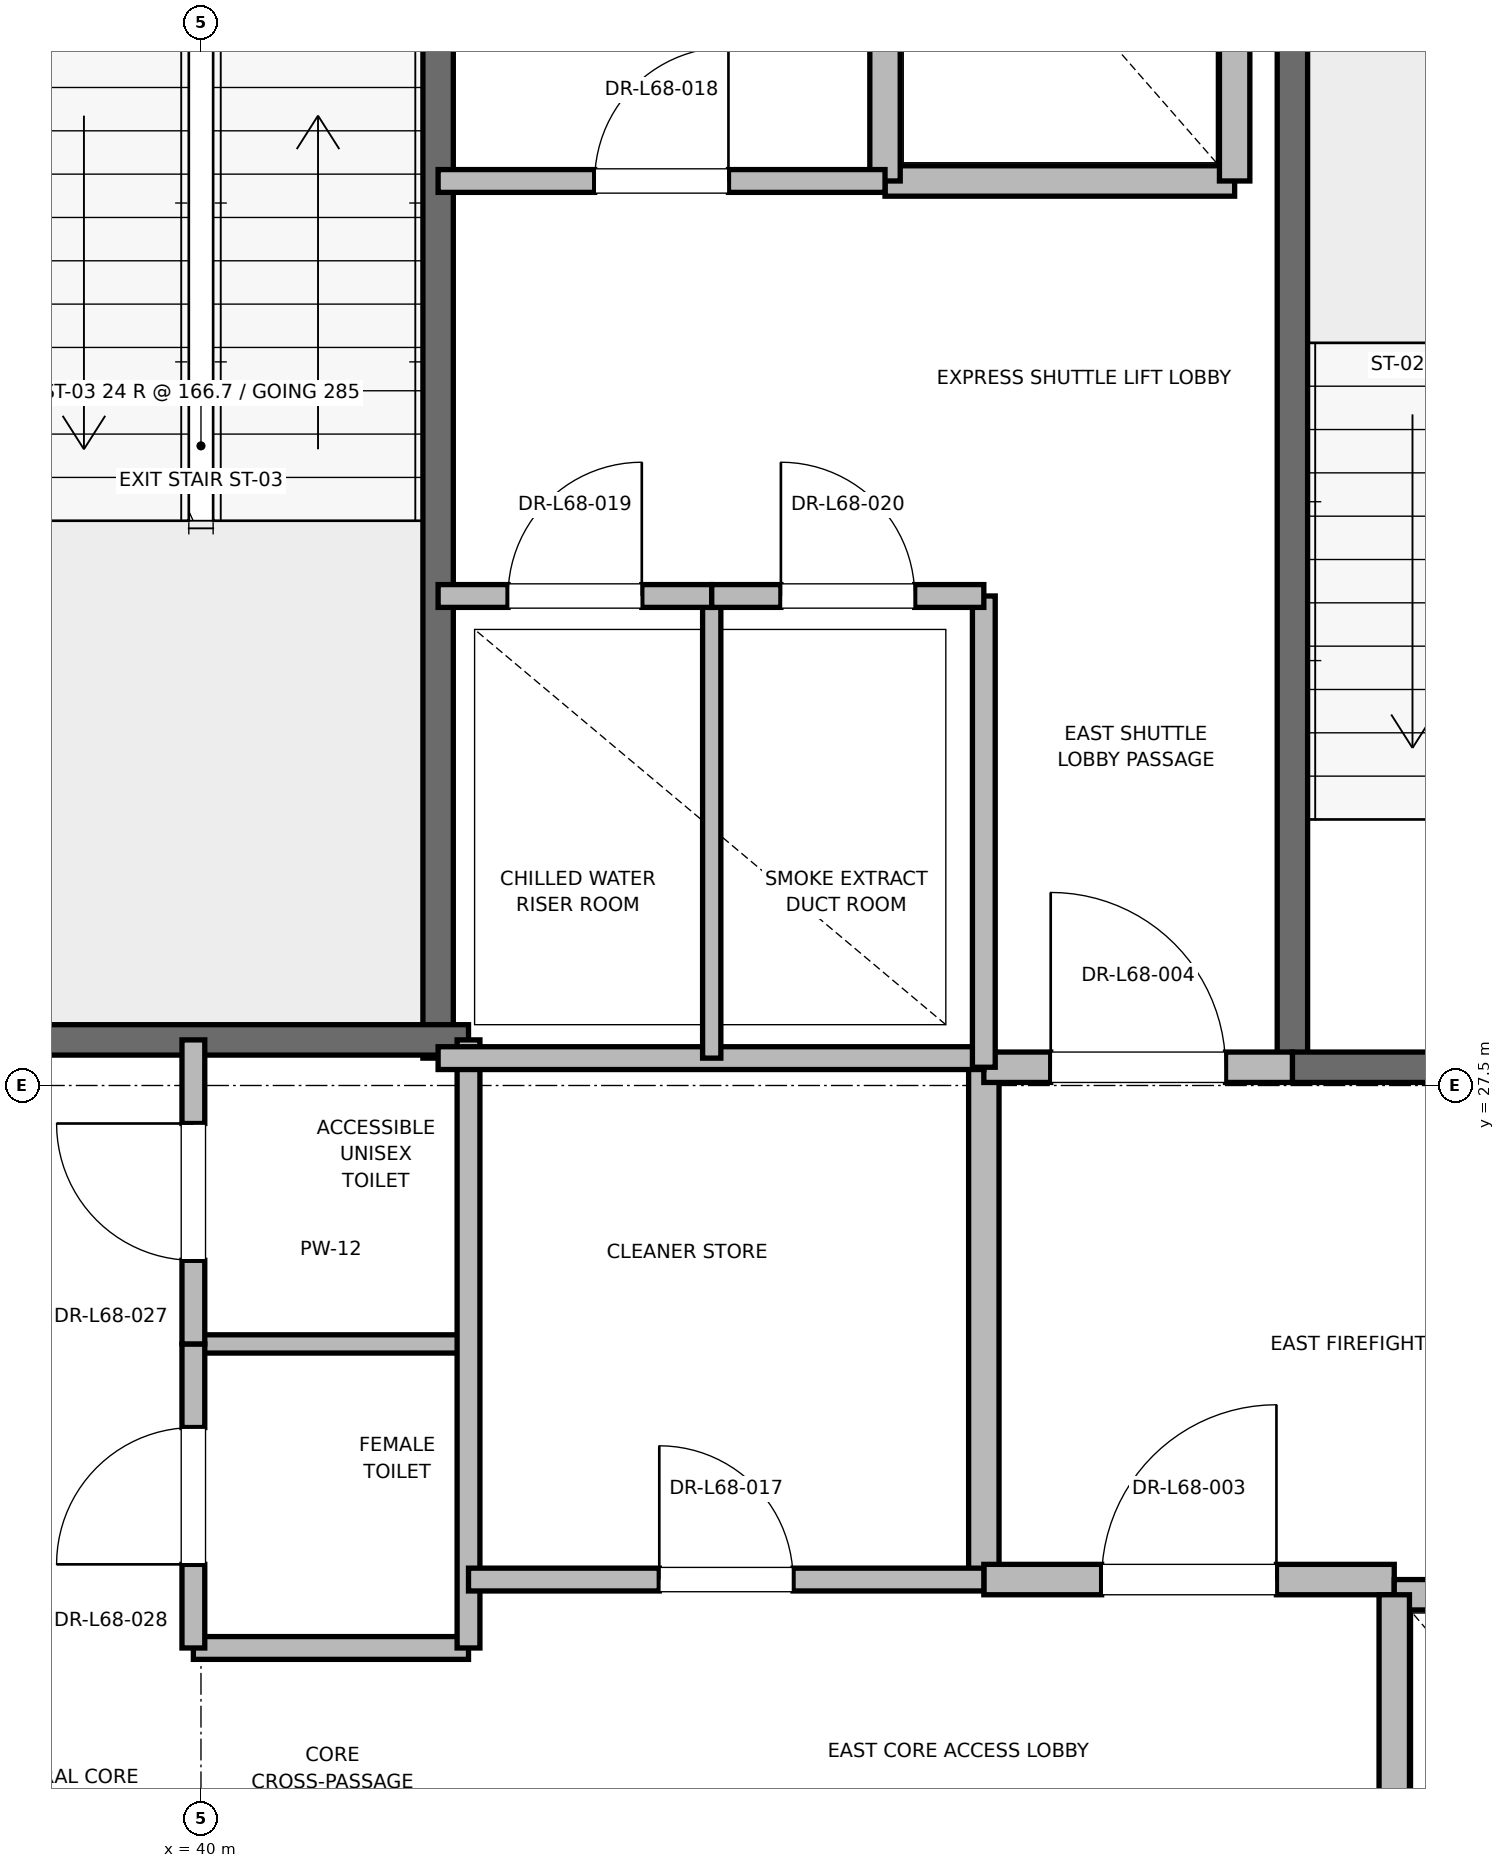
"""IFC4 building model, lengths in metres.
Left out: names, types, materials, properties, quantities, classifications, styles, units other than length and angle.
Written with IfcOpenShell. Run it as: python <this file> out.ifc"""

import sys

from ifc_helpers import new_model, si_unit, direction, frame, frame_2d, origin, place, context, subcontext, project, spatial, rectangle, extrude, element, fill, save


model = new_model("IFC4")
c1 = context("Model", 3, precision=1e-05, world=origin(), true_north=direction((0.0, 1.0)))
c2 = subcontext(c1, "Body", "Model", "MODEL_VIEW")
j1 = project(units=[si_unit("LENGTHUNIT", "METRE"), si_unit("PLANEANGLEUNIT", "RADIAN")], contexts=[c1])
p1 = place(None, origin())
s1 = spatial("IfcSite", under=j1, at=p1, CompositionType="ELEMENT")
p2 = place(p1, origin())
s2 = spatial("IfcBuilding", under=s1, at=p2, CompositionType="ELEMENT")
p3 = place(p2, frame((0.0, 0.0, 291.2)))
s3 = spatial("IfcBuildingStorey", under=s2, at=p3, CompositionType="ELEMENT", Elevation=291.2)
p4 = place(p3, frame((47.18, 27.62, 0.0), z_axis=(0.0, 0.0, 1.0), x_axis=(0.0, 1.0, 0.0)))
e1 = element("IfcWall", 1, at=p4, inside=s3, PredefinedType="SOLIDWALL", context=c2, shape_type="SweptSolid", body=[
    extrude(rectangle(XDim=8.18, YDim=0.2, at=frame_2d((4.09, 0.0))), origin(), (0.0, 0.0, 1.0), 3.7),
])
p5 = place(p3, frame((47.18, 27.62, 0.0), z_axis=(0.0, 0.0, 1.0), x_axis=(1.0, 0.0, 0.0)))
e2 = element("IfcWall", 2, at=p5, inside=s3, PredefinedType="SOLIDWALL", context=c2, shape_type="SweptSolid", body=[
    extrude(rectangle(XDim=3.12, YDim=0.2, at=frame_2d((1.56, 0.0))), origin(), (0.0, 0.0, 1.0), 3.7),
])
p6 = place(p5, frame((1.01, 0.0, 0.0)))
e3 = element("IfcOpeningElement", 3, at=p6, cuts=e2, PredefinedType="OPENING", context=c2, shape_type="SweptSolid", body=[
    extrude(rectangle(XDim=1.1, YDim=2.15, at=frame_2d((0.55, 1.075))), frame((0.0, 0.1, 0.0), z_axis=(0.0, -1.0, 0.0), x_axis=(1.0, 0.0, 0.0)), (0.0, 0.0, 1.0), 0.2),
])
p7 = place(p3, frame((41.56, 27.68, 0.0), z_axis=(0.0, 0.0, 1.0), x_axis=(0.0, 1.0, 0.0)))
e4 = element("IfcWall", 4, at=p7, inside=s3, PredefinedType="SOLIDWALL", context=c2, shape_type="SweptSolid", body=[
    extrude(rectangle(XDim=8.57, YDim=0.2, at=frame_2d((4.285, 0.0))), origin(), (0.0, 0.0, 1.0), 3.7),
])
p8 = place(p3, frame((38.44, 27.8, 0.0), z_axis=(0.0, 0.0, 1.0), x_axis=(1.0, 0.0, 0.0)))
e5 = element("IfcWall", 5, at=p8, inside=s3, PredefinedType="SOLIDWALL", context=c2, shape_type="SweptSolid", body=[
    extrude(rectangle(XDim=3.32, YDim=0.2, at=frame_2d((1.66, 0.0))), origin(), (0.0, 0.0, 1.0), 3.7),
])
p9 = place(p3, frame((45.15, 24.25, 0.0), z_axis=(0.0, 0.0, 1.0), x_axis=(0.0, 1.0, 0.0)))
e6 = element("IfcWall", 6, at=p9, inside=s3, PredefinedType="PARTITIONING", context=c2, shape_type="SweptSolid", body=[
    extrude(rectangle(XDim=3.37, YDim=0.2, at=frame_2d((1.685, 0.0))), origin(), (0.0, 0.0, 1.0), 3.7),
])
p10 = place(p3, frame((45.15, 24.25, 0.0), z_axis=(0.0, 0.0, 1.0), x_axis=(1.0, 0.0, 0.0)))
e7 = element("IfcWall", 7, at=p10, inside=s3, PredefinedType="PARTITIONING", context=c2, shape_type="SweptSolid", body=[
    extrude(rectangle(XDim=2.7, YDim=0.2, at=frame_2d((1.35, 0.0))), origin(), (0.0, 0.0, 1.0), 3.7),
])
p11 = place(p10, frame((0.775, 0.0, 0.0)))
e8 = element("IfcOpeningElement", 8, at=p11, cuts=e7, PredefinedType="OPENING", context=c2, shape_type="SweptSolid", body=[
    extrude(rectangle(XDim=1.15, YDim=2.2, at=frame_2d((0.575, 1.1))), frame((0.0, 0.1, 0.0), z_axis=(0.0, -1.0, 0.0), x_axis=(1.0, 0.0, 0.0)), (0.0, 0.0, 1.0), 0.2),
])
p12 = place(p3, frame((45.15, 27.62, 0.0), z_axis=(0.0, 0.0, 1.0), x_axis=(1.0, 0.0, 0.0)))
e9 = element("IfcWall", 9, at=p12, inside=s3, PredefinedType="PARTITIONING", context=c2, shape_type="SweptSolid", body=[
    extrude(rectangle(XDim=2.03, YDim=0.2, at=frame_2d((1.015, 0.0))), origin(), (0.0, 0.0, 1.0), 3.7),
])
p13 = place(p12, frame((0.44, 0.0, 0.0)))
e10 = element("IfcOpeningElement", 10, at=p13, cuts=e9, PredefinedType="OPENING", context=c2, shape_type="SweptSolid", body=[
    extrude(rectangle(XDim=1.15, YDim=2.2, at=frame_2d((0.575, 1.1))), frame((0.0, 0.1, 0.0), z_axis=(0.0, -1.0, 0.0), x_axis=(1.0, 0.0, 0.0)), (0.0, 0.0, 1.0), 0.2),
])
p14 = place(p3, frame((50.45, 24.15, 0.0), z_axis=(0.0, 0.0, 1.0), x_axis=(-1.0, 0.0, 0.0)))
e11 = element("IfcWall", 11, at=p14, inside=s3, PredefinedType="SOLIDWALL", context=c2, shape_type="SweptSolid", body=[
    extrude(rectangle(XDim=2.6, YDim=0.2, at=frame_2d((1.3, 0.0))), origin(), (0.0, 0.0, 1.0), 2.78),
])
p15 = place(p14, frame((0.75, 0.0, 0.0)))
e12 = element("IfcOpeningElement", 12, at=p15, cuts=e11, PredefinedType="OPENING", context=c2, shape_type="SweptSolid", body=[
    extrude(rectangle(XDim=1.1, YDim=2.2, at=frame_2d((0.55, 1.1))), frame((0.0, 0.1, 0.0), z_axis=(0.0, -1.0, 0.0), x_axis=(1.0, 0.0, 0.0)), (0.0, 0.0, 1.0), 0.2),
])
p16 = place(p3, frame((47.85, 24.15, 0.0), z_axis=(0.0, 0.0, 1.0), x_axis=(0.0, -1.0, 0.0)))
e13 = element("IfcWall", 13, at=p16, inside=s3, PredefinedType="SOLIDWALL", context=c2, shape_type="SweptSolid", body=[
    extrude(rectangle(XDim=3.0, YDim=0.2, at=frame_2d((1.5, 0.0))), origin(), (0.0, 0.0, 1.0), 3.7),
])
p17 = place(p3, frame((44.5, 33.45, 0.0), z_axis=(0.0, 0.0, 1.0), x_axis=(1.0, 0.0, 0.0)))
e14 = element("IfcWall", 14, at=p17, inside=s3, PredefinedType="SOLIDWALL", context=c2, shape_type="SweptSolid", body=[
    extrude(rectangle(XDim=2.3, YDim=0.2, at=frame_2d((1.15, 0.0))), origin(), (0.0, 0.0, 1.0), 3.7),
])
p18 = place(p3, frame((44.5, 36.05, 0.0), z_axis=(0.0, 0.0, 1.0), x_axis=(0.0, -1.0, 0.0)))
e15 = element("IfcWall", 15, at=p18, inside=s3, PredefinedType="SOLIDWALL", context=c2, shape_type="SweptSolid", body=[
    extrude(rectangle(XDim=2.6, YDim=0.2, at=frame_2d((1.3, 0.0))), origin(), (0.0, 0.0, 1.0), 2.78),
])
p19 = place(p3, frame((46.8, 33.45, 0.0), z_axis=(0.0, 0.0, 1.0), x_axis=(0.0, 1.0, 0.0)))
e16 = element("IfcWall", 16, at=p19, inside=s3, PredefinedType="SOLIDWALL", context=c2, shape_type="SweptSolid", body=[
    extrude(rectangle(XDim=2.6, YDim=0.2, at=frame_2d((1.3, 0.0))), origin(), (0.0, 0.0, 1.0), 3.7),
])
p20 = place(p3, frame((39.95, 23.8, 0.0), z_axis=(0.0, 0.0, 1.0), x_axis=(1.0, 0.0, 0.0)))
e17 = element("IfcWall", 17, at=p20, inside=s3, PredefinedType="PARTITIONING", context=c2, shape_type="SweptSolid", body=[
    extrude(rectangle(XDim=1.81, YDim=0.15, at=frame_2d((0.905, 0.0))), origin(), (0.0, 0.0, 1.0), 2.85),
])
p21 = place(p3, frame((39.95, 25.8, 0.0), z_axis=(0.0, 0.0, 1.0), x_axis=(1.0, 0.0, 0.0)))
e18 = element("IfcWall", 18, at=p21, inside=s3, PredefinedType="PARTITIONING", context=c2, shape_type="SweptSolid", body=[
    extrude(rectangle(XDim=1.81, YDim=0.12, at=frame_2d((0.905, 0.0))), origin(), (0.0, 0.0, 1.0), 2.85),
])
p22 = place(p3, frame((41.76, 23.8, 0.0), z_axis=(0.0, 0.0, 1.0), x_axis=(0.0, 1.0, 0.0)))
e19 = element("IfcWall", 19, at=p22, inside=s3, PredefinedType="PARTITIONING", context=c2, shape_type="SweptSolid", body=[
    extrude(rectangle(XDim=4.0, YDim=0.15, at=frame_2d((2.0, 0.0))), origin(), (0.0, 0.0, 1.0), 2.85),
])
p23 = place(p3, frame((39.95, 23.8, 0.0), z_axis=(0.0, 0.0, 1.0), x_axis=(0.0, 1.0, 0.0)))
e20 = element("IfcWall", 20, at=p23, inside=s3, PredefinedType="PARTITIONING", context=c2, shape_type="SweptSolid", body=[
    extrude(rectangle(XDim=2.0, YDim=0.15, at=frame_2d((1.0, 0.0))), origin(), (0.0, 0.0, 1.0), 2.85),
])
p24 = place(p23, frame((0.55, 0.0, 0.0)))
e21 = element("IfcOpeningElement", 21, at=p24, cuts=e20, PredefinedType="OPENING", context=c2, shape_type="SweptSolid", body=[
    extrude(rectangle(XDim=0.9, YDim=2.1, at=frame_2d((0.45, 1.05))), frame((0.0, 0.075, 0.0), z_axis=(0.0, -1.0, 0.0), x_axis=(1.0, 0.0, 0.0)), (0.0, 0.0, 1.0), 0.15),
])
p25 = place(p3, frame((39.95, 25.8, 0.0), z_axis=(0.0, 0.0, 1.0), x_axis=(0.0, 1.0, 0.0)))
e22 = element("IfcWall", 22, at=p25, inside=s3, PredefinedType="PARTITIONING", context=c2, shape_type="SweptSolid", body=[
    extrude(rectangle(XDim=2.0, YDim=0.15, at=frame_2d((1.0, 0.0))), origin(), (0.0, 0.0, 1.0), 2.85),
])
p26 = place(p25, frame((0.55, 0.0, 0.0)))
e23 = element("IfcOpeningElement", 23, at=p26, cuts=e22, PredefinedType="OPENING", context=c2, shape_type="SweptSolid", body=[
    extrude(rectangle(XDim=0.9, YDim=2.1, at=frame_2d((0.45, 1.05))), frame((0.0, 0.075, 0.0), z_axis=(0.0, -1.0, 0.0), x_axis=(1.0, 0.0, 0.0)), (0.0, 0.0, 1.0), 0.15),
])
p27 = place(p3, frame((41.56, 27.68, 0.0), z_axis=(0.0, 0.0, 1.0), x_axis=(1.0, 0.0, 0.0)))
e24 = element("IfcWall", 24, at=p27, inside=s3, PredefinedType="PARTITIONING", context=c2, shape_type="SweptSolid", body=[
    extrude(rectangle(XDim=3.59, YDim=0.15, at=frame_2d((1.795, 0.0))), origin(), (0.0, 0.0, 1.0), 2.85),
])
p28 = place(p3, frame((41.76, 24.25, 0.0), z_axis=(0.0, 0.0, 1.0), x_axis=(1.0, 0.0, 0.0)))
e25 = element("IfcWall", 25, at=p28, inside=s3, PredefinedType="PARTITIONING", context=c2, shape_type="SweptSolid", body=[
    extrude(rectangle(XDim=3.39, YDim=0.15, at=frame_2d((1.695, 0.0))), origin(), (0.0, 0.0, 1.0), 2.85),
])
p29 = place(p28, frame((1.255, 0.0, 0.0)))
e26 = element("IfcOpeningElement", 26, at=p29, cuts=e25, PredefinedType="OPENING", context=c2, shape_type="SweptSolid", body=[
    extrude(rectangle(XDim=0.88, YDim=2.1, at=frame_2d((0.44, 1.05))), frame((0.0, 0.075, 0.0), z_axis=(0.0, -1.0, 0.0), x_axis=(1.0, 0.0, 0.0)), (0.0, 0.0, 1.0), 0.15),
])
p30 = place(p3, frame((45.15, 27.62, 0.0), z_axis=(0.0, 0.0, 1.0), x_axis=(0.0, 1.0, 0.0)))
e27 = element("IfcWall", 27, at=p30, inside=s3, PredefinedType="PARTITIONING", context=c2, shape_type="SweptSolid", body=[
    extrude(rectangle(XDim=3.1, YDim=0.15, at=frame_2d((1.55, 0.0))), origin(), (0.0, 0.0, 1.0), 2.85),
])
p31 = place(p3, frame((43.36, 27.68, 0.0), z_axis=(0.0, 0.0, 1.0), x_axis=(0.0, 1.0, 0.0)))
e28 = element("IfcWall", 28, at=p31, inside=s3, PredefinedType="PARTITIONING", context=c2, shape_type="SweptSolid", body=[
    extrude(rectangle(XDim=3.04, YDim=0.12, at=frame_2d((1.52, 0.0))), origin(), (0.0, 0.0, 1.0), 2.85),
])
p32 = place(p3, frame((41.56, 30.72, 0.0), z_axis=(0.0, 0.0, 1.0), x_axis=(1.0, 0.0, 0.0)))
e29 = element("IfcWall", 29, at=p32, inside=s3, PredefinedType="PARTITIONING", context=c2, shape_type="SweptSolid", body=[
    extrude(rectangle(XDim=1.8, YDim=0.15, at=frame_2d((0.9, 0.0))), origin(), (0.0, 0.0, 1.0), 2.85),
])
p33 = place(p32, frame((0.46, 0.0, 0.0)))
e30 = element("IfcOpeningElement", 30, at=p33, cuts=e29, PredefinedType="OPENING", context=c2, shape_type="SweptSolid", body=[
    extrude(rectangle(XDim=0.88, YDim=2.1, at=frame_2d((0.44, 1.05))), frame((0.0, 0.075, 0.0), z_axis=(0.0, -1.0, 0.0), x_axis=(1.0, 0.0, 0.0)), (0.0, 0.0, 1.0), 0.15),
])
p34 = place(p3, frame((43.36, 30.72, 0.0), z_axis=(0.0, 0.0, 1.0), x_axis=(1.0, 0.0, 0.0)))
e31 = element("IfcWall", 31, at=p34, inside=s3, PredefinedType="PARTITIONING", context=c2, shape_type="SweptSolid", body=[
    extrude(rectangle(XDim=1.79, YDim=0.15, at=frame_2d((0.895, 0.0))), origin(), (0.0, 0.0, 1.0), 2.85),
])
p35 = place(p34, frame((0.455, 0.0, 0.0)))
e32 = element("IfcOpeningElement", 32, at=p35, cuts=e31, PredefinedType="OPENING", context=c2, shape_type="SweptSolid", body=[
    extrude(rectangle(XDim=0.88, YDim=2.1, at=frame_2d((0.44, 1.05))), frame((0.0, 0.075, 0.0), z_axis=(0.0, -1.0, 0.0), x_axis=(1.0, 0.0, 0.0)), (0.0, 0.0, 1.0), 0.15),
])
p36 = place(p3, frame((41.56, 33.45, 0.0), z_axis=(0.0, 0.0, 1.0), x_axis=(1.0, 0.0, 0.0)))
e33 = element("IfcWall", 33, at=p36, inside=s3, PredefinedType="PARTITIONING", context=c2, shape_type="SweptSolid", body=[
    extrude(rectangle(XDim=2.94, YDim=0.15, at=frame_2d((1.47, 0.0))), origin(), (0.0, 0.0, 1.0), 2.85),
])
p37 = place(p36, frame((1.03, 0.0, 0.0)))
e34 = element("IfcOpeningElement", 34, at=p37, cuts=e33, PredefinedType="OPENING", context=c2, shape_type="SweptSolid", body=[
    extrude(rectangle(XDim=0.88, YDim=2.1, at=frame_2d((0.44, 1.05))), frame((0.0, 0.075, 0.0), z_axis=(0.0, -1.0, 0.0), x_axis=(1.0, 0.0, 0.0)), (0.0, 0.0, 1.0), 0.15),
])
p38 = place(p11, origin())
e35 = element("IfcDoor", 35, at=p38, inside=s3, OperationType="SINGLE_SWING_RIGHT", PredefinedType="DOOR", context=c2, shape_type="SweptSolid", body=[
    extrude(rectangle(XDim=1.15, YDim=2.2, at=frame_2d((0.575, 1.1))), frame((0.0, 0.025, 0.0), z_axis=(0.0, -1.0, 0.0), x_axis=(1.0, 0.0, 0.0)), (0.0, 0.0, 1.0), 0.05),
])
fill(e8, e35)
p39 = place(p13, origin())
e36 = element("IfcDoor", 36, at=p39, inside=s3, OperationType="SINGLE_SWING_LEFT", PredefinedType="DOOR", context=c2, shape_type="SweptSolid", body=[
    extrude(rectangle(XDim=1.15, YDim=2.2, at=frame_2d((0.575, 1.1))), frame((0.0, 0.025, 0.0), z_axis=(0.0, -1.0, 0.0), x_axis=(1.0, 0.0, 0.0)), (0.0, 0.0, 1.0), 0.05),
])
fill(e10, e36)
p40 = place(p24, origin())
e37 = element("IfcDoor", 37, at=p40, inside=s3, OperationType="SINGLE_SWING_LEFT", PredefinedType="DOOR", context=c2, shape_type="SweptSolid", body=[
    extrude(rectangle(XDim=0.9, YDim=2.1, at=frame_2d((0.45, 1.05))), frame((0.0, 0.025, 0.0), z_axis=(0.0, -1.0, 0.0), x_axis=(1.0, 0.0, 0.0)), (0.0, 0.0, 1.0), 0.05),
])
fill(e21, e37)
p41 = place(p26, origin())
e38 = element("IfcDoor", 38, at=p41, inside=s3, OperationType="SINGLE_SWING_RIGHT", PredefinedType="DOOR", context=c2, shape_type="SweptSolid", body=[
    extrude(rectangle(XDim=0.9, YDim=2.1, at=frame_2d((0.45, 1.05))), frame((0.0, 0.025, 0.0), z_axis=(0.0, -1.0, 0.0), x_axis=(1.0, 0.0, 0.0)), (0.0, 0.0, 1.0), 0.05),
])
fill(e23, e38)
p42 = place(p29, origin())
e39 = element("IfcDoor", 39, at=p42, inside=s3, OperationType="SINGLE_SWING_LEFT", PredefinedType="DOOR", context=c2, shape_type="SweptSolid", body=[
    extrude(rectangle(XDim=0.88, YDim=2.1, at=frame_2d((0.44, 1.05))), frame((0.0, 0.025, 0.0), z_axis=(0.0, -1.0, 0.0), x_axis=(1.0, 0.0, 0.0)), (0.0, 0.0, 1.0), 0.05),
])
fill(e26, e39)
p43 = place(p33, origin())
e40 = element("IfcDoor", 40, at=p43, inside=s3, OperationType="SINGLE_SWING_RIGHT", PredefinedType="DOOR", context=c2, shape_type="SweptSolid", body=[
    extrude(rectangle(XDim=0.88, YDim=2.1, at=frame_2d((0.44, 1.05))), frame((0.0, 0.025, 0.0), z_axis=(0.0, -1.0, 0.0), x_axis=(1.0, 0.0, 0.0)), (0.0, 0.0, 1.0), 0.05),
])
fill(e30, e40)
p44 = place(p35, origin())
e41 = element("IfcDoor", 41, at=p44, inside=s3, OperationType="SINGLE_SWING_LEFT", PredefinedType="DOOR", context=c2, shape_type="SweptSolid", body=[
    extrude(rectangle(XDim=0.88, YDim=2.1, at=frame_2d((0.44, 1.05))), frame((0.0, 0.025, 0.0), z_axis=(0.0, -1.0, 0.0), x_axis=(1.0, 0.0, 0.0)), (0.0, 0.0, 1.0), 0.05),
])
fill(e32, e41)
p45 = place(p37, origin())
e42 = element("IfcDoor", 42, at=p45, inside=s3, OperationType="SINGLE_SWING_RIGHT", PredefinedType="DOOR", context=c2, shape_type="SweptSolid", body=[
    extrude(rectangle(XDim=0.88, YDim=2.1, at=frame_2d((0.44, 1.05))), frame((0.0, 0.025, 0.0), z_axis=(0.0, -1.0, 0.0), x_axis=(1.0, 0.0, 0.0)), (0.0, 0.0, 1.0), 0.05),
])
fill(e34, e42)
save(model, sys.argv[1])
